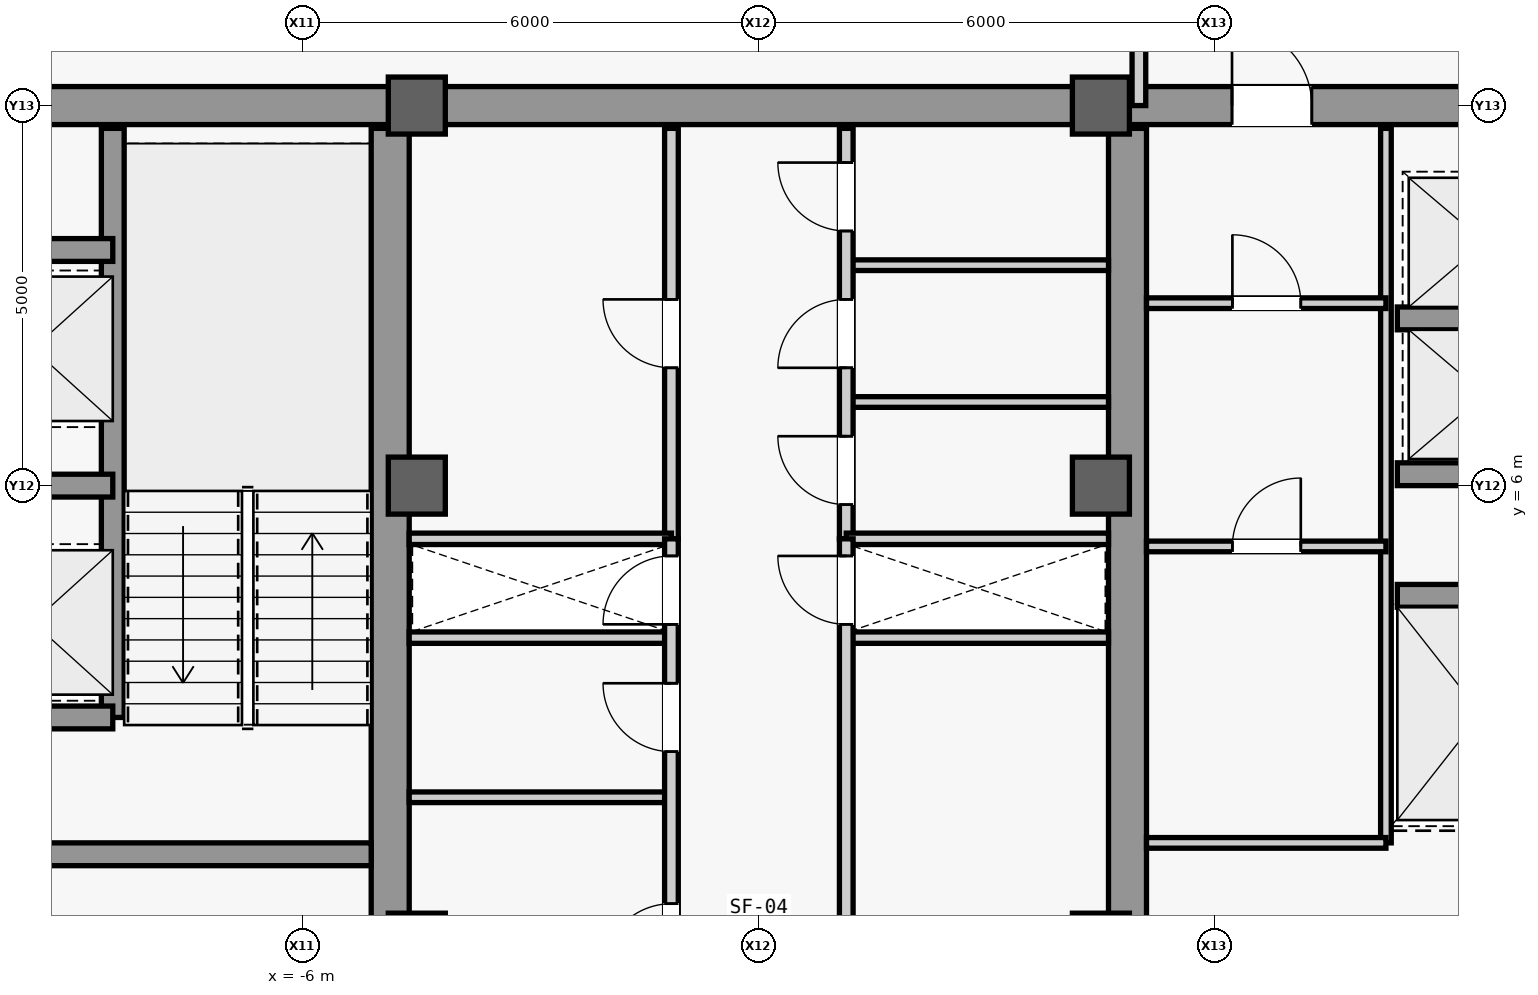
"""IFC4 building model, lengths in metres.
Left out: names, types, materials, properties, quantities, classifications, styles, units other than length and angle.
Written with IfcOpenShell. Run it as: python <this file> out.ifc"""

import sys

from ifc_helpers import new_model, si_unit, direction, frame, frame_2d, origin, origin_2d, place, context, subcontext, project, spatial, rectangle, extrude, source, transform, mapped, element, fill, save


model = new_model("IFC4")
c1 = context("Model", 3, precision=1e-05, world=origin(), true_north=direction((0.0, 1.0)))
c2 = subcontext(c1, "Body", "Model", "MODEL_VIEW")
j1 = project(units=[si_unit("LENGTHUNIT", "METRE"), si_unit("PLANEANGLEUNIT", "RADIAN")], contexts=[c1])
p1 = place(None, origin())
s1 = spatial("IfcSite", under=j1, at=p1, CompositionType="ELEMENT")
p2 = place(p1, origin())
s2 = spatial("IfcBuilding", under=s1, at=p2, CompositionType="ELEMENT")
p3 = place(p2, frame((0.0, 0.0, 330.3)))
s3 = spatial("IfcBuildingStorey", under=s2, at=p3, CompositionType="ELEMENT", Elevation=330.3)
m1 = source(origin(), c2, "Body", "SweptSolid", [
    extrude(rectangle(XDim=21.4, YDim=0.5, at=frame_2d((10.7, 0.0))), origin(), (0.0, 0.0, 1.0), 3.74),
])
for number, where, z_axis, x_axis in (
    (1, (-4.85, -10.7, 0.0), (0.0, 0.0, 1.0), (0.0, 1.0, 0.0)),
    (2, (4.85, -10.7, 0.0), (0.0, 0.0, 1.0), (0.0, 1.0, 0.0)),
):
    element("IfcWall", number, at=place(p3, frame(where, z_axis=z_axis, x_axis=x_axis)), inside=s3, PredefinedType="SHEAR", context=c2, shape_type="MappedRepresentation", body=[
        mapped(m1, transform((0.0, 0.0, 0.0), scale=1.0)),
    ])
m2 = source(origin(), c2, "Body", "SweptSolid", [
    extrude(rectangle(XDim=5.9, YDim=0.5, at=frame_2d((2.95, 0.0))), origin(), (0.0, 0.0, 1.0), 3.74),
])
p4 = place(p3, frame((-10.75, 11.0, 0.0), z_axis=(0.0, 0.0, 1.0), x_axis=(1.0, 0.0, 0.0)))
e3 = element("IfcWall", 3, at=p4, inside=s3, PredefinedType="SHEAR", context=c2, shape_type="MappedRepresentation", body=[
    mapped(m2, transform((0.0, 0.0, 0.0), scale=1.0)),
])
p5 = place(p3, frame((4.85, 11.0, 0.0), z_axis=(0.0, 0.0, 1.0), x_axis=(1.0, 0.0, 0.0)))
e4 = element("IfcWall", 4, at=p5, inside=s3, PredefinedType="SHEAR", context=c2, shape_type="MappedRepresentation", body=[
    mapped(m2, transform((0.0, 0.0, 0.0), scale=1.0)),
])
m3 = source(origin(), c2, "Body", "SweptSolid", [
    extrude(rectangle(XDim=1.05, YDim=2.2, at=frame_2d((0.525, 1.1))), frame((0.0, 0.26, 0.0), z_axis=(0.0, -1.0, 0.0), x_axis=(1.0, 0.0, 0.0)), (0.0, 0.0, 1.0), 0.52),
])
p6 = place(p5, frame((1.375, 0.0, 0.0)))
e5 = element("IfcOpeningElement", 5, at=p6, cuts=e4, PredefinedType="OPENING", context=c2, shape_type="MappedRepresentation", body=[
    mapped(m3, transform((0.0, 0.0, 0.0), scale=1.0)),
])
m4 = source(origin(), c2, "Body", "SweptSolid", [
    extrude(rectangle(XDim=5.65, YDim=0.3, at=frame_2d((2.825, 0.0))), origin(), (0.0, 0.0, 1.0), 3.74),
])
p7 = place(p3, frame((-10.75, 1.15, 0.0), z_axis=(0.0, 0.0, 1.0), x_axis=(1.0, 0.0, 0.0)))
e6 = element("IfcWall", 6, at=p7, inside=s3, PredefinedType="SHEAR", context=c2, shape_type="MappedRepresentation", body=[
    mapped(m4, transform((0.0, 0.0, 0.0), scale=1.0)),
])
m5 = source(origin(), c2, "Body", "SweptSolid", [
    extrude(rectangle(XDim=9.2, YDim=0.5, at=frame_2d((4.6, 0.0))), origin(), (0.0, 0.0, 1.0), 3.74),
])
p8 = place(p3, frame((-4.6, 11.0, 0.0), z_axis=(0.0, 0.0, 1.0), x_axis=(1.0, 0.0, 0.0)))
e7 = element("IfcWall", 7, at=p8, inside=s3, PredefinedType="SHEAR", context=c2, shape_type="MappedRepresentation", body=[
    mapped(m5, transform((0.0, 0.0, 0.0), scale=1.0)),
])
m6 = source(origin(), c2, "Body", "SweptSolid", [
    extrude(rectangle(XDim=0.75, YDim=0.75, at=origin_2d()), origin(), (0.0, 0.0, 1.0), 4.0),
])
for number, where, z_axis, x_axis in (
    (8, (-4.5, 0.0, 0.0), (0.0, 0.0, 1.0), (1.0, 0.0, 0.0)),
    (9, (-4.5, 6.0, 0.0), (0.0, 0.0, 1.0), (1.0, 0.0, 0.0)),
    (10, (-4.5, 11.0, 0.0), (0.0, 0.0, 1.0), (1.0, 0.0, 0.0)),
    (11, (4.5, 0.0, 0.0), (0.0, 0.0, 1.0), (1.0, 0.0, 0.0)),
    (12, (4.5, 6.0, 0.0), (0.0, 0.0, 1.0), (1.0, 0.0, 0.0)),
    (13, (4.5, 11.0, 0.0), (0.0, 0.0, 1.0), (1.0, 0.0, 0.0)),
):
    element("IfcColumn", number, at=place(p3, frame(where, z_axis=z_axis, x_axis=x_axis)), inside=s3, PredefinedType="COLUMN", context=c2, shape_type="MappedRepresentation", body=[
        mapped(m6, transform((0.0, 0.0, 0.0), scale=1.0)),
    ])
m7 = source(origin(), c2, "Body", "SweptSolid", [
    extrude(rectangle(XDim=7.75, YDim=0.3, at=frame_2d((3.875, 0.0))), origin(), (0.0, 0.0, 1.0), 3.74),
])
p9 = place(p3, frame((-8.5, 2.95, 0.0), z_axis=(0.0, 0.0, 1.0), x_axis=(0.0, 1.0, 0.0)))
e14 = element("IfcWall", 14, at=p9, inside=s3, PredefinedType="SHEAR", context=c2, shape_type="MappedRepresentation", body=[
    mapped(m7, transform((0.0, 0.0, 0.0), scale=1.0)),
])
m8 = source(origin(), c2, "Body", "SweptSolid", [
    extrude(rectangle(XDim=2.2, YDim=0.3, at=frame_2d((1.1, 0.0))), origin(), (0.0, 0.0, 1.0), 3.74),
])
for number, where, z_axis, x_axis in (
    (15, (-10.7, 2.95, 0.0), (0.0, 0.0, 1.0), (1.0, 0.0, 0.0)),
    (16, (-10.7, 6.0, 0.0), (0.0, 0.0, 1.0), (1.0, 0.0, 0.0)),
    (17, (-10.7, 9.1, 0.0), (0.0, 0.0, 1.0), (1.0, 0.0, 0.0)),
):
    element("IfcWall", number, at=place(p3, frame(where, z_axis=z_axis, x_axis=x_axis)), inside=s3, PredefinedType="SHEAR", context=c2, shape_type="MappedRepresentation", body=[
        mapped(m8, transform((0.0, 0.0, 0.0), scale=1.0)),
    ])
m9 = source(origin(), c2, "Body", "SweptSolid", [
    extrude(rectangle(XDim=2.3, YDim=0.3, at=frame_2d((1.15, 0.0))), origin(), (0.0, 0.0, 1.0), 3.74),
])
for number, where, z_axis, x_axis in (
    (18, (8.4, 4.55, 0.0), (0.0, 0.0, 1.0), (1.0, 0.0, 0.0)),
    (19, (8.4, 6.15, 0.0), (0.0, 0.0, 1.0), (1.0, 0.0, 0.0)),
    (20, (8.4, 8.2, 0.0), (0.0, 0.0, 1.0), (1.0, 0.0, 0.0)),
):
    element("IfcWall", number, at=place(p3, frame(where, z_axis=z_axis, x_axis=x_axis)), inside=s3, PredefinedType="SHEAR", context=c2, shape_type="MappedRepresentation", body=[
        mapped(m9, transform((0.0, 0.0, 0.0), scale=1.0)),
    ])
m10 = source(origin(), c2, "Body", "SweptSolid", [
    extrude(rectangle(XDim=9.4, YDim=0.14, at=frame_2d((4.7, 0.0))), origin(), (0.0, 0.0, 1.0), 3.74),
])
p10 = place(p3, frame((8.25, 1.3, 0.0), z_axis=(0.0, 0.0, 1.0), x_axis=(0.0, 1.0, 0.0)))
e21 = element("IfcWall", 21, at=p10, inside=s3, PredefinedType="PARTITIONING", context=c2, shape_type="MappedRepresentation", body=[
    mapped(m10, transform((0.0, 0.0, 0.0), scale=1.0)),
])
m11 = source(origin(), c2, "Body", "SweptSolid", [
    extrude(rectangle(XDim=3.15, YDim=0.14, at=frame_2d((1.575, 0.0))), origin(), (0.0, 0.0, 1.0), 3.74),
])
p11 = place(p3, frame((5.1, 1.3, 0.0), z_axis=(0.0, 0.0, 1.0), x_axis=(1.0, 0.0, 0.0)))
e22 = element("IfcWall", 22, at=p11, inside=s3, PredefinedType="PARTITIONING", context=c2, shape_type="MappedRepresentation", body=[
    mapped(m11, transform((0.0, 0.0, 0.0), scale=1.0)),
])
p12 = place(p3, frame((5.1, 8.4, 0.0), z_axis=(0.0, 0.0, 1.0), x_axis=(1.0, 0.0, 0.0)))
e23 = element("IfcWall", 23, at=p12, inside=s3, PredefinedType="PARTITIONING", context=c2, shape_type="MappedRepresentation", body=[
    mapped(m11, transform((0.0, 0.0, 0.0), scale=1.0)),
])
m12 = source(origin(), c2, "Body", "SweptSolid", [
    extrude(rectangle(XDim=0.9, YDim=2.15, at=frame_2d((0.45, 1.075))), frame((0.0, 0.08, 0.0), z_axis=(0.0, -1.0, 0.0), x_axis=(1.0, 0.0, 0.0)), (0.0, 0.0, 1.0), 0.16),
])
p13 = place(p12, frame((1.13, 0.0, 0.0)))
e24 = element("IfcOpeningElement", 24, at=p13, cuts=e23, PredefinedType="OPENING", context=c2, shape_type="MappedRepresentation", body=[
    mapped(m12, transform((0.0, 0.0, 0.0), scale=1.0)),
])
p14 = place(p3, frame((5.1, 5.2, 0.0), z_axis=(0.0, 0.0, 1.0), x_axis=(1.0, 0.0, 0.0)))
e25 = element("IfcWall", 25, at=p14, inside=s3, PredefinedType="PARTITIONING", context=c2, shape_type="MappedRepresentation", body=[
    mapped(m11, transform((0.0, 0.0, 0.0), scale=1.0)),
])
p15 = place(p14, frame((1.13, 0.0, 0.0)))
e26 = element("IfcOpeningElement", 26, at=p15, cuts=e25, PredefinedType="OPENING", context=c2, shape_type="MappedRepresentation", body=[
    mapped(m12, transform((0.0, 0.0, 0.0), scale=1.0)),
])
m13 = source(origin(), c2, "Body", "SweptSolid", [
    extrude(rectangle(XDim=3.45, YDim=0.15, at=frame_2d((1.725, 0.0))), origin(), (0.0, 0.0, 1.0), 3.74),
])
for number, where, z_axis, x_axis in (
    (27, (-4.6, 4.0, 0.0), (0.0, 0.0, 1.0), (1.0, 0.0, 0.0)),
    (28, (1.15, 4.0, 0.0), (0.0, 0.0, 1.0), (1.0, 0.0, 0.0)),
):
    element("IfcWall", number, at=place(p3, frame(where, z_axis=z_axis, x_axis=x_axis)), inside=s3, PredefinedType="PARTITIONING", context=c2, shape_type="MappedRepresentation", body=[
        mapped(m13, transform((0.0, 0.0, 0.0), scale=1.0)),
    ])
m14 = source(origin(), c2, "Body", "SweptSolid", [
    extrude(rectangle(XDim=5.4, YDim=0.18, at=frame_2d((2.7, 0.0))), origin(), (0.0, 0.0, 1.0), 3.74),
])
p16 = place(p3, frame((-1.15, 5.3, 0.0), z_axis=(0.0, 0.0, 1.0), x_axis=(0.0, 1.0, 0.0)))
e29 = element("IfcWall", 29, at=p16, inside=s3, PredefinedType="PARTITIONING", context=c2, shape_type="MappedRepresentation", body=[
    mapped(m14, transform((0.0, 0.0, 0.0), scale=1.0)),
])
m15 = source(origin(), c2, "Body", "SweptSolid", [
    extrude(rectangle(XDim=0.9, YDim=2.15, at=frame_2d((0.45, 1.075))), frame((0.0, 0.1, 0.0), z_axis=(0.0, -1.0, 0.0), x_axis=(1.0, 0.0, 0.0)), (0.0, 0.0, 1.0), 0.2),
])
p17 = place(p16, frame((2.25, 0.0, 0.0)))
e30 = element("IfcOpeningElement", 30, at=p17, cuts=e29, PredefinedType="OPENING", context=c2, shape_type="MappedRepresentation", body=[
    mapped(m15, transform((0.0, 0.0, 0.0), scale=1.0)),
])
m16 = source(origin(), c2, "Body", "SweptSolid", [
    extrude(rectangle(XDim=3.45, YDim=0.14, at=frame_2d((1.725, 0.0))), origin(), (0.0, 0.0, 1.0), 3.74),
])
for number, where, z_axis, x_axis in (
    (31, (1.15, 7.1, 0.0), (0.0, 0.0, 1.0), (1.0, 0.0, 0.0)),
    (32, (1.15, 8.9, 0.0), (0.0, 0.0, 1.0), (1.0, 0.0, 0.0)),
):
    element("IfcWall", number, at=place(p3, frame(where, z_axis=z_axis, x_axis=x_axis)), inside=s3, PredefinedType="PARTITIONING", context=c2, shape_type="MappedRepresentation", body=[
        mapped(m16, transform((0.0, 0.0, 0.0), scale=1.0)),
    ])
p18 = place(p3, frame((1.15, 5.3, 0.0), z_axis=(0.0, 0.0, 1.0), x_axis=(0.0, 1.0, 0.0)))
e33 = element("IfcWall", 33, at=p18, inside=s3, PredefinedType="PARTITIONING", context=c2, shape_type="MappedRepresentation", body=[
    mapped(m14, transform((0.0, 0.0, 0.0), scale=1.0)),
])
p19 = place(p18, frame((0.45, 0.0, 0.0)))
e34 = element("IfcOpeningElement", 34, at=p19, cuts=e33, PredefinedType="OPENING", context=c2, shape_type="MappedRepresentation", body=[
    mapped(m15, transform((0.0, 0.0, 0.0), scale=1.0)),
])
p20 = place(p18, frame((2.25, 0.0, 0.0)))
e35 = element("IfcOpeningElement", 35, at=p20, cuts=e33, PredefinedType="OPENING", context=c2, shape_type="MappedRepresentation", body=[
    mapped(m15, transform((0.0, 0.0, 0.0), scale=1.0)),
])
p21 = place(p18, frame((4.05, 0.0, 0.0)))
e36 = element("IfcOpeningElement", 36, at=p21, cuts=e33, PredefinedType="OPENING", context=c2, shape_type="MappedRepresentation", body=[
    mapped(m15, transform((0.0, 0.0, 0.0), scale=1.0)),
])
for number, where, z_axis, x_axis in (
    (37, (-4.6, 5.3, 0.0), (0.0, 0.0, 1.0), (1.0, 0.0, 0.0)),
    (38, (1.15, 5.3, 0.0), (0.0, 0.0, 1.0), (1.0, 0.0, 0.0)),
):
    element("IfcWall", number, at=place(p3, frame(where, z_axis=z_axis, x_axis=x_axis)), inside=s3, PredefinedType="PARTITIONING", context=c2, shape_type="MappedRepresentation", body=[
        mapped(m13, transform((0.0, 0.0, 0.0), scale=1.0)),
    ])
p22 = place(p3, frame((-4.6, 1.9, 0.0), z_axis=(0.0, 0.0, 1.0), x_axis=(1.0, 0.0, 0.0)))
e39 = element("IfcWall", 39, at=p22, inside=s3, PredefinedType="PARTITIONING", context=c2, shape_type="MappedRepresentation", body=[
    mapped(m16, transform((0.0, 0.0, 0.0), scale=1.0)),
])
m17 = source(origin(), c2, "Body", "SweptSolid", [
    extrude(rectangle(XDim=10.6, YDim=0.18, at=frame_2d((5.3, 0.0))), origin(), (0.0, 0.0, 1.0), 3.74),
])
p23 = place(p3, frame((-1.15, -5.3, 0.0), z_axis=(0.0, 0.0, 1.0), x_axis=(0.0, 1.0, 0.0)))
e40 = element("IfcWall", 40, at=p23, inside=s3, PredefinedType="PARTITIONING", context=c2, shape_type="MappedRepresentation", body=[
    mapped(m17, transform((0.0, 0.0, 0.0), scale=1.0)),
])
p24 = place(p23, frame((1.3, 0.0, 0.0)))
e41 = element("IfcOpeningElement", 41, at=p24, cuts=e40, PredefinedType="OPENING", context=c2, shape_type="MappedRepresentation", body=[
    mapped(m15, transform((0.0, 0.0, 0.0), scale=1.0)),
])
p25 = place(p23, frame((4.9, 0.0, 0.0)))
e42 = element("IfcOpeningElement", 42, at=p25, cuts=e40, PredefinedType="OPENING", context=c2, shape_type="MappedRepresentation", body=[
    mapped(m15, transform((0.0, 0.0, 0.0), scale=1.0)),
])
p26 = place(p23, frame((7.8, 0.0, 0.0)))
e43 = element("IfcOpeningElement", 43, at=p26, cuts=e40, PredefinedType="OPENING", context=c2, shape_type="MappedRepresentation", body=[
    mapped(m15, transform((0.0, 0.0, 0.0), scale=1.0)),
])
p27 = place(p23, frame((9.475, 0.0, 0.0)))
e44 = element("IfcOpeningElement", 44, at=p27, cuts=e40, PredefinedType="OPENING", context=c2, shape_type="MappedRepresentation", body=[
    mapped(m15, transform((0.0, 0.0, 0.0), scale=1.0)),
])
p28 = place(p3, frame((1.15, -5.3, 0.0), z_axis=(0.0, 0.0, 1.0), x_axis=(0.0, 1.0, 0.0)))
e45 = element("IfcWall", 45, at=p28, inside=s3, PredefinedType="PARTITIONING", context=c2, shape_type="MappedRepresentation", body=[
    mapped(m17, transform((0.0, 0.0, 0.0), scale=1.0)),
])
p29 = place(p28, frame((4.2, 0.0, 0.0)))
e46 = element("IfcOpeningElement", 46, at=p29, cuts=e45, PredefinedType="OPENING", context=c2, shape_type="MappedRepresentation", body=[
    mapped(m15, transform((0.0, 0.0, 0.0), scale=1.0)),
])
p30 = place(p28, frame((9.475, 0.0, 0.0)))
e47 = element("IfcOpeningElement", 47, at=p30, cuts=e45, PredefinedType="OPENING", context=c2, shape_type="MappedRepresentation", body=[
    mapped(m15, transform((0.0, 0.0, 0.0), scale=1.0)),
])
m18 = source(origin(), c2, "Body", "SweptSolid", [
    extrude(rectangle(XDim=2.6, YDim=0.18, at=frame_2d((1.3, 0.0))), origin(), (0.0, 0.0, 1.0), 3.74),
])
p31 = place(p3, frame((5.0, 11.0, 0.0), z_axis=(0.0, 0.0, 1.0), x_axis=(0.0, 1.0, 0.0)))
e48 = element("IfcWall", 48, at=p31, inside=s3, PredefinedType="PARTITIONING", context=c2, shape_type="MappedRepresentation", body=[
    mapped(m18, transform((0.0, 0.0, 0.0), scale=1.0)),
])
p32 = place(p31, frame((0.85, 0.0, 0.0)))
e49 = element("IfcOpeningElement", 49, at=p32, cuts=e48, PredefinedType="OPENING", context=c2, shape_type="MappedRepresentation", body=[
    mapped(m15, transform((0.0, 0.0, 0.0), scale=1.0)),
])
m19 = source(origin(), c2, "Body", "SweptSolid", [
    extrude(rectangle(XDim=1.05, YDim=2.2, at=frame_2d((0.525, 1.1))), frame((0.0, 0.025, 0.0), z_axis=(0.0, -1.0, 0.0), x_axis=(1.0, 0.0, 0.0)), (0.0, 0.0, 1.0), 0.05),
])
p33 = place(p6, origin())
e50 = element("IfcDoor", 50, at=p33, inside=s3, OperationType="SINGLE_SWING_LEFT", PredefinedType="DOOR", context=c2, shape_type="MappedRepresentation", body=[
    mapped(m19, transform((0.0, 0.0, 0.0), scale=1.0)),
])
fill(e5, e50)
m20 = source(origin(), c2, "Body", "SweptSolid", [
    extrude(rectangle(XDim=0.9, YDim=2.15, at=frame_2d((0.45, 1.075))), frame((0.0, 0.025, 0.0), z_axis=(0.0, -1.0, 0.0), x_axis=(1.0, 0.0, 0.0)), (0.0, 0.0, 1.0), 0.05),
])
p34 = place(p13, origin())
e51 = element("IfcDoor", 51, at=p34, inside=s3, OperationType="SINGLE_SWING_LEFT", PredefinedType="DOOR", context=c2, shape_type="MappedRepresentation", body=[
    mapped(m20, transform((0.0, 0.0, 0.0), scale=1.0)),
])
fill(e24, e51)
p35 = place(p15, origin())
e52 = element("IfcDoor", 52, at=p35, inside=s3, OperationType="SINGLE_SWING_RIGHT", PredefinedType="DOOR", context=c2, shape_type="MappedRepresentation", body=[
    mapped(m20, transform((0.0, 0.0, 0.0), scale=1.0)),
])
fill(e26, e52)
p36 = place(p17, origin())
e53 = element("IfcDoor", 53, at=p36, inside=s3, OperationType="SINGLE_SWING_RIGHT", PredefinedType="DOOR", context=c2, shape_type="MappedRepresentation", body=[
    mapped(m20, transform((0.0, 0.0, 0.0), scale=1.0)),
])
fill(e30, e53)
p37 = place(p19, origin())
e54 = element("IfcDoor", 54, at=p37, inside=s3, OperationType="SINGLE_SWING_RIGHT", PredefinedType="DOOR", context=c2, shape_type="MappedRepresentation", body=[
    mapped(m20, transform((0.0, 0.0, 0.0), scale=1.0)),
])
fill(e34, e54)
p38 = place(p20, origin())
e55 = element("IfcDoor", 55, at=p38, inside=s3, OperationType="SINGLE_SWING_LEFT", PredefinedType="DOOR", context=c2, shape_type="MappedRepresentation", body=[
    mapped(m20, transform((0.0, 0.0, 0.0), scale=1.0)),
])
fill(e35, e55)
p39 = place(p21, origin())
e56 = element("IfcDoor", 56, at=p39, inside=s3, OperationType="SINGLE_SWING_RIGHT", PredefinedType="DOOR", context=c2, shape_type="MappedRepresentation", body=[
    mapped(m20, transform((0.0, 0.0, 0.0), scale=1.0)),
])
fill(e36, e56)
p40 = place(p25, origin())
e57 = element("IfcDoor", 57, at=p40, inside=s3, OperationType="SINGLE_SWING_LEFT", PredefinedType="DOOR", context=c2, shape_type="MappedRepresentation", body=[
    mapped(m20, transform((0.0, 0.0, 0.0), scale=1.0)),
])
fill(e42, e57)
p41 = place(p26, origin())
e58 = element("IfcDoor", 58, at=p41, inside=s3, OperationType="SINGLE_SWING_RIGHT", PredefinedType="DOOR", context=c2, shape_type="MappedRepresentation", body=[
    mapped(m20, transform((0.0, 0.0, 0.0), scale=1.0)),
])
fill(e43, e58)
p42 = place(p27, origin())
e59 = element("IfcDoor", 59, at=p42, inside=s3, OperationType="SINGLE_SWING_LEFT", PredefinedType="DOOR", context=c2, shape_type="MappedRepresentation", body=[
    mapped(m20, transform((0.0, 0.0, 0.0), scale=1.0)),
])
fill(e44, e59)
p43 = place(p30, origin())
e60 = element("IfcDoor", 60, at=p43, inside=s3, OperationType="SINGLE_SWING_RIGHT", PredefinedType="DOOR", context=c2, shape_type="MappedRepresentation", body=[
    mapped(m20, transform((0.0, 0.0, 0.0), scale=1.0)),
])
fill(e47, e60)
save(model, sys.argv[1])
